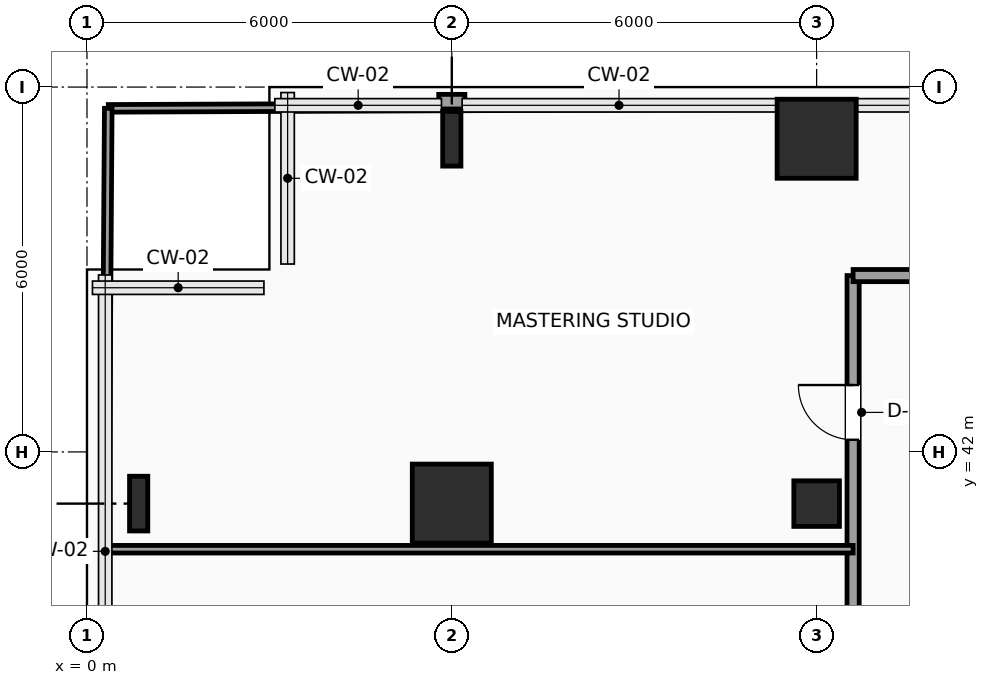
"""IFC4 building model, lengths in metres.
Left out: names, types, materials, properties, quantities, classifications, styles, units other than length and angle.
Written with IfcOpenShell. Run it as: python <this file> out.ifc"""

import sys

from ifc_helpers import new_model, si_unit, direction, frame, frame_2d, origin, origin_2d, place, context, subcontext, project, spatial, rectangle, hollow_rectangle, i_section, extrude, element, fill, save


model = new_model("IFC4")
c1 = context("Model", 3, precision=1e-05, world=origin(), true_north=direction((0.0, 1.0)))
c2 = subcontext(c1, "Body", "Model", "MODEL_VIEW")
j1 = project(units=[si_unit("LENGTHUNIT", "METRE"), si_unit("PLANEANGLEUNIT", "RADIAN")], contexts=[c1])
p1 = place(None, origin())
s1 = spatial("IfcSite", under=j1, at=p1, CompositionType="ELEMENT")
p2 = place(p1, origin())
s2 = spatial("IfcBuilding", under=s1, at=p2, CompositionType="ELEMENT")
p3 = place(p2, frame((0.0, 0.0, 48.0)))
s3 = spatial("IfcBuildingStorey", under=s2, at=p3, CompositionType="ELEMENT", Elevation=48.0)
p4 = place(p3, frame((0.85, 41.15, 0.0), z_axis=(0.0, 0.0, 1.0), x_axis=(1.0, 0.0, 0.0)))
e1 = element("IfcColumn", 1, at=p4, inside=s3, PredefinedType="COLUMN", context=c2, shape_type="SweptSolid", body=[
    extrude(i_section(OverallWidth=0.3, OverallDepth=0.9, WebThickness=0.019, FlangeThickness=0.035, FilletRadius=0.03, at=origin_2d()), origin(), (0.0, 0.0, 1.0), 3.9),
])
p5 = place(p3, frame((6.0, 41.15, 0.0), z_axis=(0.0, 0.0, 1.0), x_axis=(1.0, 0.0, 0.0)))
e2 = element("IfcColumn", 2, at=p5, inside=s3, PredefinedType="COLUMN", context=c2, shape_type="SweptSolid", body=[
    extrude(rectangle(XDim=1.3, YDim=1.3, at=origin_2d()), origin(), (0.0, 0.0, 1.0), 3.9),
])
p6 = place(p3, frame((6.0, 47.15, 0.0), z_axis=(0.0, 0.0, 1.0), x_axis=(1.0, 0.0, 0.0)))
e3 = element("IfcColumn", 3, at=p6, inside=s3, PredefinedType="COLUMN", context=c2, shape_type="SweptSolid", body=[
    extrude(i_section(OverallWidth=0.3, OverallDepth=0.9, WebThickness=0.019, FlangeThickness=0.035, FilletRadius=0.03, at=origin_2d()), origin(), (0.0, 0.0, 1.0), 3.9),
])
p7 = place(p3, frame((12.0, 41.15, 0.0), z_axis=(0.0, 0.0, 1.0), x_axis=(1.0, 0.0, 0.0)))
e4 = element("IfcColumn", 4, at=p7, inside=s3, PredefinedType="COLUMN", context=c2, shape_type="SweptSolid", body=[
    extrude(hollow_rectangle(XDim=0.75, YDim=0.75, WallThickness=0.035, InnerFilletRadius=0.035, OuterFilletRadius=0.05, at=origin_2d()), origin(), (0.0, 0.0, 1.0), 3.9),
])
p8 = place(p3, frame((12.0, 47.15, 0.0), z_axis=(0.0, 0.0, 1.0), x_axis=(1.0, 0.0, 0.0)))
e5 = element("IfcColumn", 5, at=p8, inside=s3, PredefinedType="COLUMN", context=c2, shape_type="SweptSolid", body=[
    extrude(rectangle(XDim=1.3, YDim=1.3, at=origin_2d()), origin(), (0.0, 0.0, 1.0), 3.9),
])
p9 = place(p3, frame((5.785, 47.76, 0.0), z_axis=(0.0, 0.0, 1.0), x_axis=(1.0, 0.0, 0.0)))
e6 = element("IfcWall", 6, at=p9, inside=s3, PredefinedType="SOLIDWALL", context=c2, shape_type="SweptSolid", body=[
    extrude(rectangle(XDim=0.43, YDim=0.24, at=frame_2d((0.215, 0.0))), origin(), (0.0, 0.0, 1.0), 3.65),
])
p10 = place(p3, frame((12.6, 32.65, 0.0), z_axis=(0.0, 0.0, 1.0), x_axis=(0.0, 1.0, 0.0)))
e7 = element("IfcWall", 7, at=p10, inside=s3, PredefinedType="PARTITIONING", context=c2, shape_type="SweptSolid", body=[
    extrude(rectangle(XDim=12.25, YDim=0.2, at=frame_2d((6.125, 0.0))), origin(), (0.0, 0.0, 1.0), 3.65),
])
p11 = place(p10, frame((0.98, 0.0, 0.0)))
e8 = element("IfcOpeningElement", 8, at=p11, cuts=e7, PredefinedType="OPENING", context=c2, shape_type="SweptSolid", body=[
    extrude(rectangle(XDim=0.9, YDim=2.1, at=frame_2d((0.45, 1.05))), frame((0.0, 0.11, 0.0), z_axis=(0.0, -1.0, 0.0), x_axis=(1.0, 0.0, 0.0)), (0.0, 0.0, 1.0), 0.22),
])
p12 = place(p10, frame((5.2, 0.0, 0.0)))
e9 = element("IfcOpeningElement", 9, at=p12, cuts=e7, PredefinedType="OPENING", context=c2, shape_type="SweptSolid", body=[
    extrude(rectangle(XDim=0.9, YDim=2.1, at=frame_2d((0.45, 1.05))), frame((0.0, 0.11, 0.0), z_axis=(0.0, -1.0, 0.0), x_axis=(1.0, 0.0, 0.0)), (0.0, 0.0, 1.0), 0.22),
])
p13 = place(p10, frame((9.55, 0.0, 0.0)))
e10 = element("IfcOpeningElement", 10, at=p13, cuts=e7, PredefinedType="OPENING", context=c2, shape_type="SweptSolid", body=[
    extrude(rectangle(XDim=0.9, YDim=2.1, at=frame_2d((0.45, 1.05))), frame((0.0, 0.11, 0.0), z_axis=(0.0, -1.0, 0.0), x_axis=(1.0, 0.0, 0.0)), (0.0, 0.0, 1.0), 0.22),
])
p14 = place(p3, frame((12.6, 44.9, 0.0), z_axis=(0.0, 0.0, 1.0), x_axis=(1.0, 0.0, 0.0)))
e11 = element("IfcWall", 11, at=p14, inside=s3, PredefinedType="PARTITIONING", context=c2, shape_type="SweptSolid", body=[
    extrude(rectangle(XDim=2.35, YDim=0.2, at=frame_2d((1.175, 0.0))), origin(), (0.0, 0.0, 1.0), 3.65),
])
p15 = place(p3, frame((0.3, 40.4, 0.0), z_axis=(0.0, 0.0, 1.0), x_axis=(1.0, 0.0, 0.0)))
e12 = element("IfcWall", 12, at=p15, inside=s3, PredefinedType="PARTITIONING", context=c2, shape_type="SweptSolid", body=[
    extrude(rectangle(XDim=12.3, YDim=0.125, at=frame_2d((6.15, 0.0))), origin(), (0.0, 0.0, 1.0), 3.65),
])
p16 = place(p3, frame((0.35, 47.65, 0.0), z_axis=(0.0, 0.0, 1.0), x_axis=(0.999991644778, 0.004087832518, 0.0)))
e13 = element("IfcWall", 13, at=p16, inside=s3, PredefinedType="PARTITIONING", context=c2, shape_type="SweptSolid", body=[
    extrude(rectangle(XDim=5.435, YDim=0.125, at=frame_2d((2.717, 0.0))), origin(), (0.0, 0.0, 1.0), 3.65),
])
p17 = place(p3, frame((6.215, 47.674, 0.0), z_axis=(0.0, 0.0, 1.0), x_axis=(0.999991630701, 0.004091274595, 0.0)))
e14 = element("IfcWall", 14, at=p17, inside=s3, PredefinedType="PARTITIONING", context=c2, shape_type="SweptSolid", body=[
    extrude(rectangle(XDim=6.385, YDim=0.125, at=frame_2d((3.192, 0.0))), origin(), (0.0, 0.0, 1.0), 3.65),
])
p18 = place(p3, frame((0.3, 40.4, 0.0), z_axis=(0.0, 0.0, 1.0), x_axis=(0.006903122154, 0.999976173168, 0.0)))
e15 = element("IfcWall", 15, at=p18, inside=s3, PredefinedType="PARTITIONING", context=c2, shape_type="SweptSolid", body=[
    extrude(rectangle(XDim=7.25, YDim=0.125, at=frame_2d((3.625, 0.0))), origin(), (0.0, 0.0, 1.0), 3.65),
])
p19 = place(p13, origin())
e16 = element("IfcDoor", 16, at=p19, inside=s3, OperationType="SINGLE_SWING_RIGHT", PredefinedType="DOOR", context=c2, shape_type="SweptSolid", body=[
    extrude(rectangle(XDim=0.9, YDim=2.1, at=frame_2d((0.45, 1.05))), frame((0.0, 0.025, 0.0), z_axis=(0.0, -1.0, 0.0), x_axis=(1.0, 0.0, 0.0)), (0.0, 0.0, 1.0), 0.05),
])
fill(e10, e16)
save(model, sys.argv[1])
